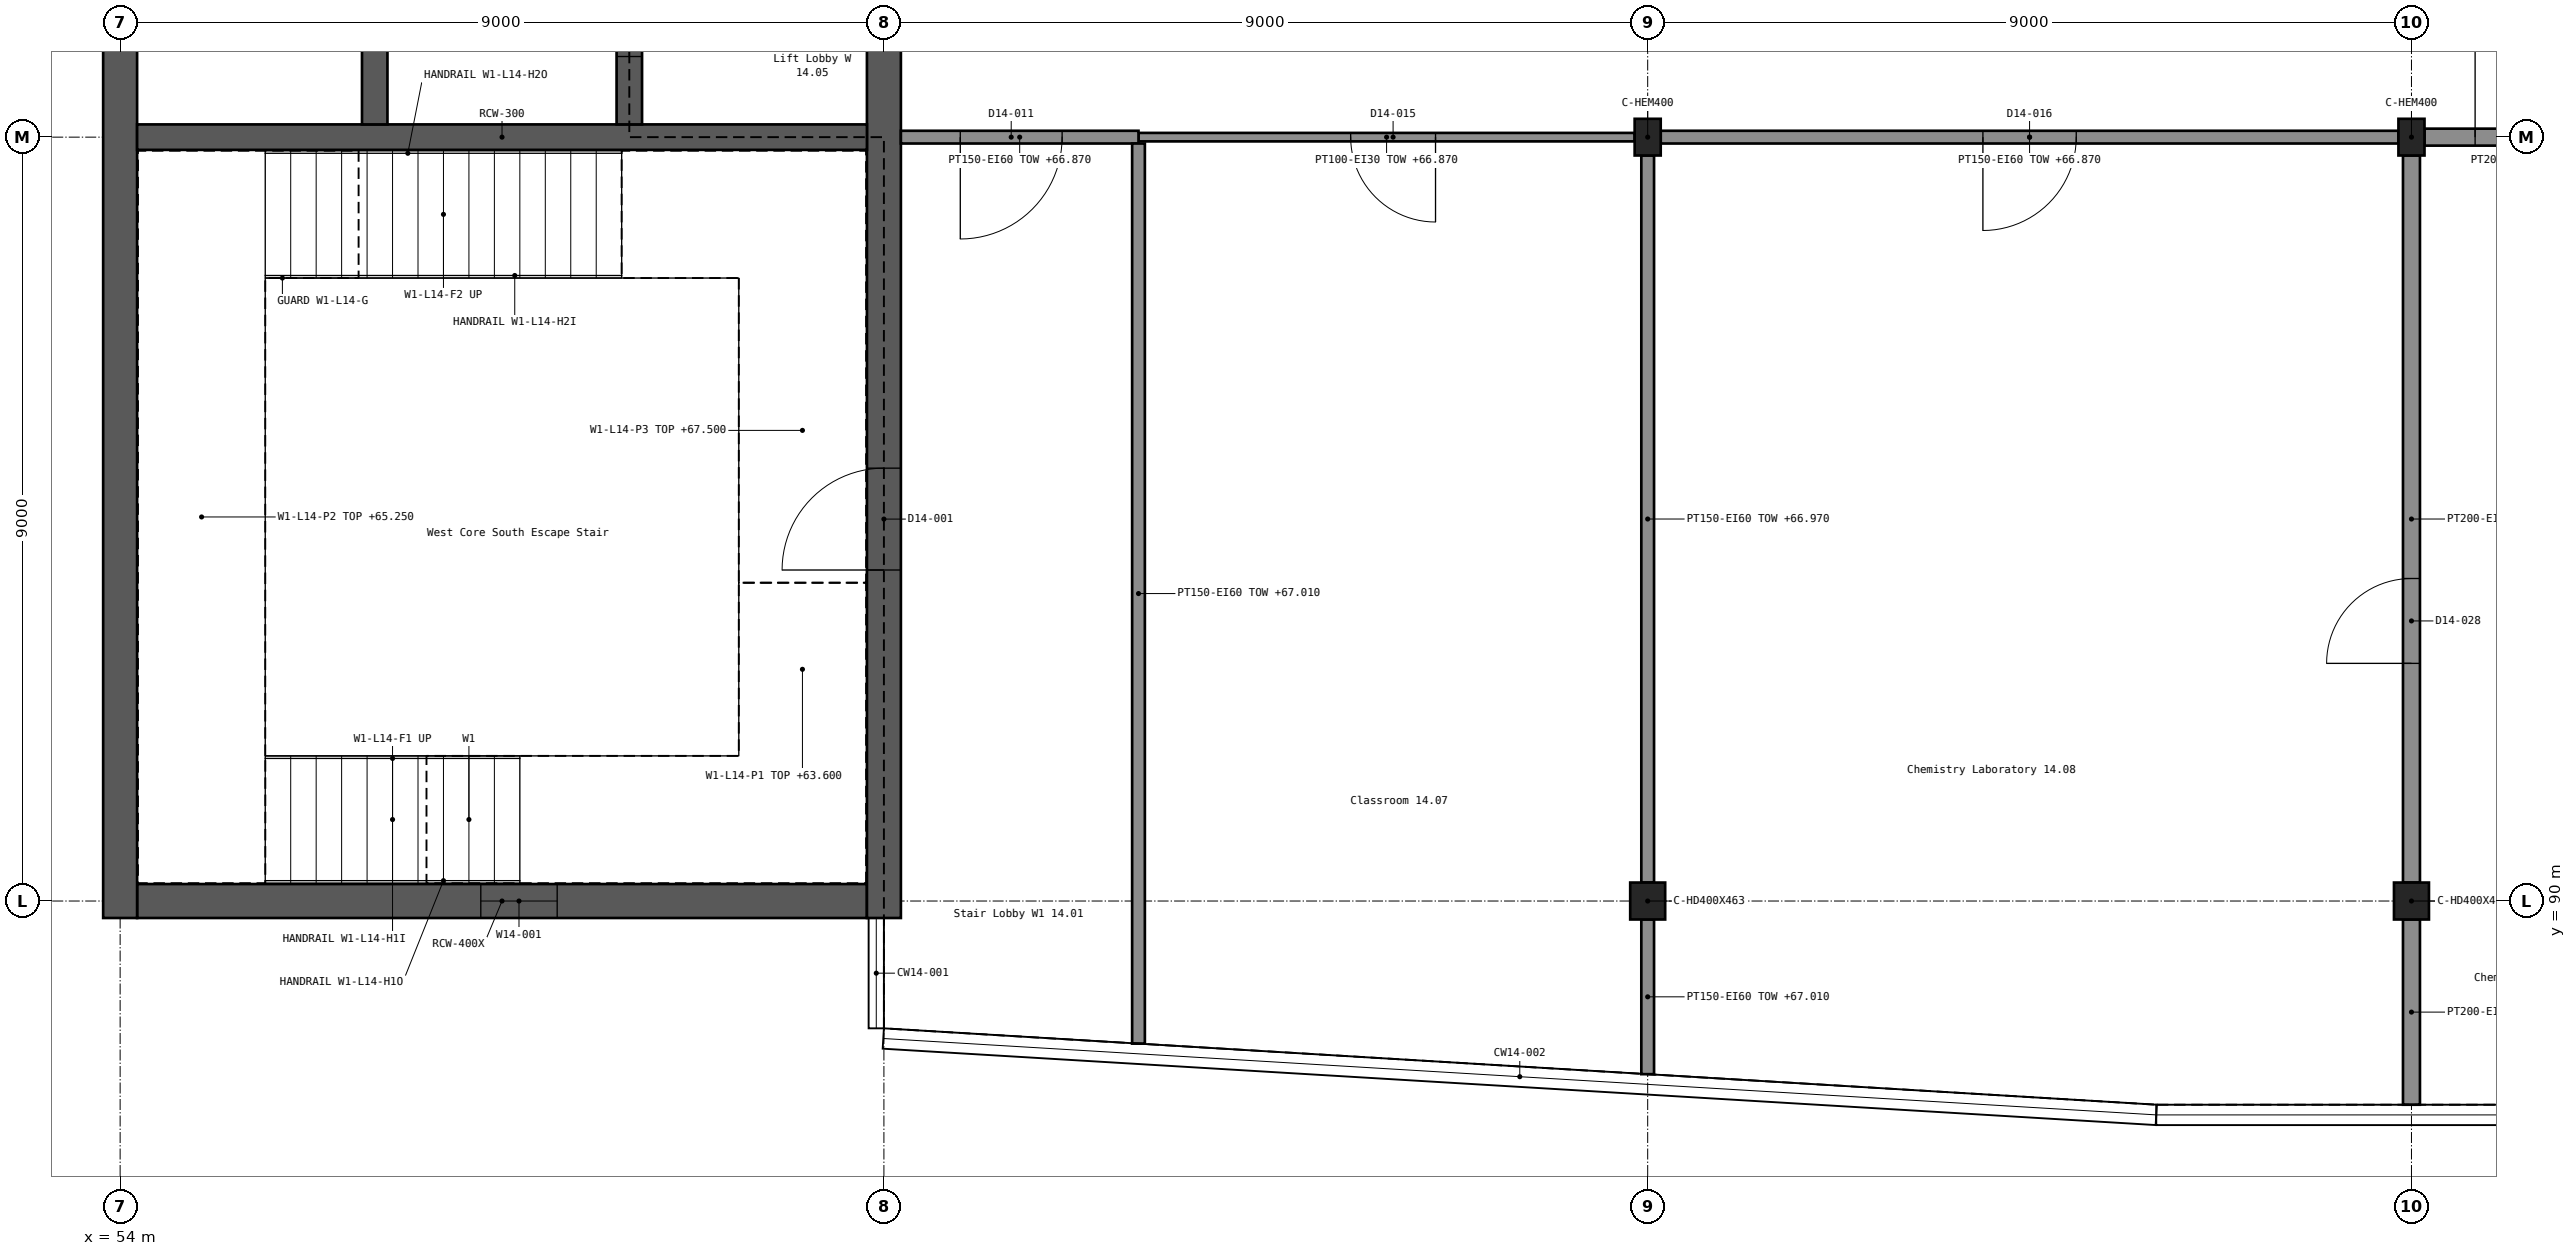
"""IFC4 building model, lengths in metres.
Left out: names, types, materials, properties, quantities, classifications, styles, units other than length and angle.
Written with IfcOpenShell. Run it as: python <this file> out.ifc"""

import sys

from ifc_helpers import new_model, si_unit, direction, frame, frame_2d, origin, origin_2d, place, context, subcontext, project, spatial, rectangle, i_section, extrude, element, fill, save


model = new_model("IFC4")
c1 = context("Model", 3, precision=1e-05, world=origin(), true_north=direction((0.0, 1.0)))
c2 = subcontext(c1, "Body", "Model", "MODEL_VIEW")
j1 = project(units=[si_unit("LENGTHUNIT", "METRE"), si_unit("PLANEANGLEUNIT", "RADIAN")], contexts=[c1])
p1 = place(None, origin())
s1 = spatial("IfcSite", under=j1, at=p1, CompositionType="ELEMENT")
p2 = place(p1, origin())
s2 = spatial("IfcBuilding", under=s1, at=p2, CompositionType="ELEMENT")
p3 = place(p2, frame((0.0, 0.0, 63.6)))
s3 = spatial("IfcBuildingStorey", under=s2, at=p3, CompositionType="ELEMENT", Elevation=63.6)
p4 = place(p3, frame((54.2, 90.0, 0.0), z_axis=(0.0, 0.0, 1.0), x_axis=(1.0, 0.0, 0.0)))
e1 = element("IfcWall", 1, at=p4, inside=s3, PredefinedType="SHEAR", context=c2, shape_type="SweptSolid", body=[
    extrude(rectangle(XDim=8.6, YDim=0.4, at=frame_2d((4.3, 0.0))), origin(), (0.0, 0.0, 1.0), 3.9),
])
p5 = place(p4, frame((4.05, 0.0, 1.2)))
e2 = element("IfcOpeningElement", 2, at=p5, cuts=e1, PredefinedType="OPENING", context=c2, shape_type="SweptSolid", body=[
    extrude(rectangle(XDim=0.9, YDim=1.5, at=frame_2d((0.45, 0.75))), frame((0.0, 0.211, 0.0), z_axis=(0.0, -1.0, 0.0), x_axis=(1.0, 0.0, 0.0)), (0.0, 0.0, 1.0), 0.422),
])
p6 = place(p3, frame((54.0, 89.8, 0.0), z_axis=(0.0, 0.0, 1.0), x_axis=(0.0, 1.0, 0.0)))
e3 = element("IfcWall", 3, at=p6, inside=s3, PredefinedType="SHEAR", context=c2, shape_type="SweptSolid", body=[
    extrude(rectangle(XDim=27.4, YDim=0.4, at=frame_2d((13.7, 0.0))), origin(), (0.0, 0.0, 1.0), 3.9),
])
p7 = place(p3, frame((63.0, 89.8, 0.0), z_axis=(0.0, 0.0, 1.0), x_axis=(0.0, 1.0, 0.0)))
e4 = element("IfcWall", 4, at=p7, inside=s3, PredefinedType="SHEAR", context=c2, shape_type="SweptSolid", body=[
    extrude(rectangle(XDim=27.4, YDim=0.4, at=frame_2d((13.7, 0.0))), origin(), (0.0, 0.0, 1.0), 3.9),
])
p8 = place(p7, frame((4.1, 0.0, 0.0)))
e5 = element("IfcOpeningElement", 5, at=p8, cuts=e4, PredefinedType="OPENING", context=c2, shape_type="SweptSolid", body=[
    extrude(rectangle(XDim=1.2, YDim=2.1, at=frame_2d((0.6, 1.05))), frame((0.0, 0.211, 0.0), z_axis=(0.0, -1.0, 0.0), x_axis=(1.0, 0.0, 0.0)), (0.0, 0.0, 1.0), 0.422),
])
p9 = place(p7, frame((22.1, 0.0, 0.0)))
e6 = element("IfcOpeningElement", 6, at=p9, cuts=e4, PredefinedType="OPENING", context=c2, shape_type="SweptSolid", body=[
    extrude(rectangle(XDim=1.2, YDim=2.1, at=frame_2d((0.6, 1.05))), frame((0.0, 0.211, 0.0), z_axis=(0.0, -1.0, 0.0), x_axis=(1.0, 0.0, 0.0)), (0.0, 0.0, 1.0), 0.422),
])
p10 = place(p7, frame((12.5, 0.0, 0.0)))
e7 = element("IfcOpeningElement", 7, at=p10, cuts=e4, PredefinedType="OPENING", context=c2, shape_type="SweptSolid", body=[
    extrude(rectangle(XDim=2.0, YDim=2.1, at=frame_2d((1.0, 1.05))), frame((0.0, 0.211, 0.0), z_axis=(0.0, -1.0, 0.0), x_axis=(1.0, 0.0, 0.0)), (0.0, 0.0, 1.0), 0.422),
])
p11 = place(p3, frame((54.2, 99.0, 0.0), z_axis=(0.0, 0.0, 1.0), x_axis=(1.0, 0.0, 0.0)))
e8 = element("IfcWall", 8, at=p11, inside=s3, PredefinedType="SHEAR", context=c2, shape_type="SweptSolid", body=[
    extrude(rectangle(XDim=8.6, YDim=0.3, at=frame_2d((4.3, 0.0))), origin(), (0.0, 0.0, 1.0), 3.9),
])
p12 = place(p3, frame((57.0, 99.15, 0.0), z_axis=(0.0, 0.0, 1.0), x_axis=(0.0, 1.0, 0.0)))
e9 = element("IfcWall", 9, at=p12, inside=s3, PredefinedType="SHEAR", context=c2, shape_type="SweptSolid", body=[
    extrude(rectangle(XDim=8.7, YDim=0.3, at=frame_2d((4.35, 0.0))), origin(), (0.0, 0.0, 1.0), 3.9),
])
p13 = place(p3, frame((60.0, 99.15, 0.0), z_axis=(0.0, 0.0, 1.0), x_axis=(0.0, 1.0, 0.0)))
e10 = element("IfcWall", 10, at=p13, inside=s3, PredefinedType="SHEAR", context=c2, shape_type="SweptSolid", body=[
    extrude(rectangle(XDim=8.7, YDim=0.3, at=frame_2d((4.35, 0.0))), origin(), (0.0, 0.0, 1.0), 3.9),
])
p14 = place(p13, frame((0.8, 0.0, 0.0)))
e11 = element("IfcOpeningElement", 11, at=p14, cuts=e10, PredefinedType="OPENING", context=c2, shape_type="SweptSolid", body=[
    extrude(rectangle(XDim=1.1, YDim=2.1, at=frame_2d((0.55, 1.05))), frame((0.0, 0.161, 0.0), z_axis=(0.0, -1.0, 0.0), x_axis=(1.0, 0.0, 0.0)), (0.0, 0.0, 1.0), 0.322),
])
p15 = place(p13, frame((3.8, 0.0, 0.0)))
e12 = element("IfcOpeningElement", 12, at=p15, cuts=e10, PredefinedType="OPENING", context=c2, shape_type="SweptSolid", body=[
    extrude(rectangle(XDim=1.1, YDim=2.1, at=frame_2d((0.55, 1.05))), frame((0.0, 0.161, 0.0), z_axis=(0.0, -1.0, 0.0), x_axis=(1.0, 0.0, 0.0)), (0.0, 0.0, 1.0), 0.322),
])
p16 = place(p13, frame((6.8, 0.0, 0.0)))
e13 = element("IfcOpeningElement", 13, at=p16, cuts=e10, PredefinedType="OPENING", context=c2, shape_type="SweptSolid", body=[
    extrude(rectangle(XDim=1.1, YDim=2.1, at=frame_2d((0.55, 1.05))), frame((0.0, 0.161, 0.0), z_axis=(0.0, -1.0, 0.0), x_axis=(1.0, 0.0, 0.0)), (0.0, 0.0, 1.0), 0.322),
])
for number, where, z_axis, x_axis in (
    (14, (72.0, 90.0, 0.0), (0.0, 0.0, 1.0), (1.0, 0.0, 0.0)),
    (15, (81.0, 90.0, 0.0), (0.0, 0.0, 1.0), (1.0, 0.0, 0.0)),
):
    element("IfcColumn", number, at=place(p3, frame(where, z_axis=z_axis, x_axis=x_axis)), inside=s3, PredefinedType="COLUMN", context=c2, shape_type="SweptSolid", body=[
        extrude(i_section(OverallWidth=0.412, OverallDepth=0.435, WebThickness=0.036, FlangeThickness=0.057, FilletRadius=0.015, at=origin_2d()), origin(), (0.0, 0.0, 1.0), 3.9),
    ])
for number, where, z_axis, x_axis in (
    (16, (72.0, 99.0, 0.0), (0.0, 0.0, 1.0), (1.0, 0.0, 0.0)),
    (17, (81.0, 99.0, 0.0), (0.0, 0.0, 1.0), (1.0, 0.0, 0.0)),
):
    element("IfcColumn", number, at=place(p3, frame(where, z_axis=z_axis, x_axis=x_axis)), inside=s3, PredefinedType="COLUMN", context=c2, shape_type="SweptSolid", body=[
        extrude(i_section(OverallWidth=0.307, OverallDepth=0.432, WebThickness=0.021, FlangeThickness=0.04, FilletRadius=0.027, at=origin_2d()), origin(), (0.0, 0.0, 1.0), 3.9),
    ])
p17 = place(p3, frame((66.0, 99.0, 0.0), z_axis=(0.0, 0.0, 1.0), x_axis=(1.0, 0.0, 0.0)))
e18 = element("IfcWall", 18, at=p17, inside=s3, PredefinedType="PARTITIONING", context=c2, shape_type="SweptSolid", body=[
    extrude(rectangle(XDim=5.846, YDim=0.1, at=frame_2d((2.923, 0.0))), origin(), (0.0, 0.0, 1.0), 3.27),
])
p18 = place(p17, frame((2.5, 0.0, 0.0)))
e19 = element("IfcOpeningElement", 19, at=p18, cuts=e18, PredefinedType="OPENING", context=c2, shape_type="SweptSolid", body=[
    extrude(rectangle(XDim=1.0, YDim=2.1, at=frame_2d((0.5, 1.05))), frame((0.0, 0.061, 0.0), z_axis=(0.0, -1.0, 0.0), x_axis=(1.0, 0.0, 0.0)), (0.0, 0.0, 1.0), 0.122),
])
p19 = place(p3, frame((63.2, 99.0, 0.0), z_axis=(0.0, 0.0, 1.0), x_axis=(1.0, 0.0, 0.0)))
e20 = element("IfcWall", 20, at=p19, inside=s3, PredefinedType="PARTITIONING", context=c2, shape_type="SweptSolid", body=[
    extrude(rectangle(XDim=2.8, YDim=0.15, at=frame_2d((1.4, 0.0))), origin(), (0.0, 0.0, 1.0), 3.27),
])
p20 = place(p19, frame((0.7, 0.0, 0.0)))
e21 = element("IfcOpeningElement", 21, at=p20, cuts=e20, PredefinedType="OPENING", context=c2, shape_type="SweptSolid", body=[
    extrude(rectangle(XDim=1.2, YDim=2.1, at=frame_2d((0.6, 1.05))), frame((0.0, 0.086, 0.0), z_axis=(0.0, -1.0, 0.0), x_axis=(1.0, 0.0, 0.0)), (0.0, 0.0, 1.0), 0.172),
])
p21 = place(p3, frame((72.154, 99.0, 0.0), z_axis=(0.0, 0.0, 1.0), x_axis=(1.0, 0.0, 0.0)))
e22 = element("IfcWall", 22, at=p21, inside=s3, PredefinedType="PARTITIONING", context=c2, shape_type="SweptSolid", body=[
    extrude(rectangle(XDim=8.693, YDim=0.15, at=frame_2d((4.346, 0.0))), origin(), (0.0, 0.0, 1.0), 3.27),
])
p22 = place(p21, frame((3.796, 0.0, 0.0)))
e23 = element("IfcOpeningElement", 23, at=p22, cuts=e22, PredefinedType="OPENING", context=c2, shape_type="SweptSolid", body=[
    extrude(rectangle(XDim=1.1, YDim=2.4, at=frame_2d((0.55, 1.2))), frame((0.0, 0.086, 0.0), z_axis=(0.0, -1.0, 0.0), x_axis=(1.0, 0.0, 0.0)), (0.0, 0.0, 1.0), 0.172),
])
p23 = place(p3, frame((81.154, 99.0, 0.0), z_axis=(0.0, 0.0, 1.0), x_axis=(1.0, 0.0, 0.0)))
e24 = element("IfcWall", 24, at=p23, inside=s3, PredefinedType="PARTITIONING", context=c2, shape_type="SweptSolid", body=[
    extrude(rectangle(XDim=2.846, YDim=0.2, at=frame_2d((1.423, 0.0))), origin(), (0.0, 0.0, 1.0), 3.27),
])
p24 = place(p23, frame((0.596, 0.0, 0.0)))
e25 = element("IfcOpeningElement", 25, at=p24, cuts=e24, PredefinedType="OPENING", context=c2, shape_type="SweptSolid", body=[
    extrude(rectangle(XDim=1.5, YDim=2.4, at=frame_2d((0.75, 1.2))), frame((0.0, 0.111, 0.0), z_axis=(0.0, -1.0, 0.0), x_axis=(1.0, 0.0, 0.0)), (0.0, 0.0, 1.0), 0.222),
])
p25 = place(p3, frame((66.0, 88.32, 0.0), z_axis=(0.0, 0.0, 1.0), x_axis=(0.0, 1.0, 0.0)))
e26 = element("IfcWall", 26, at=p25, inside=s3, PredefinedType="PARTITIONING", context=c2, shape_type="SweptSolid", body=[
    extrude(rectangle(XDim=10.605, YDim=0.15, at=frame_2d((5.302, 0.0))), origin(), (0.0, 0.0, 1.0), 3.41),
])
p26 = place(p3, frame((72.0, 87.96, 0.0), z_axis=(0.0, 0.0, 1.0), x_axis=(0.0, 1.0, 0.0)))
e27 = element("IfcWall", 27, at=p26, inside=s3, PredefinedType="PARTITIONING", context=c2, shape_type="SweptSolid", body=[
    extrude(rectangle(XDim=1.823, YDim=0.15, at=frame_2d((0.911, 0.0))), origin(), (0.0, 0.0, 1.0), 3.41),
])
p27 = place(p3, frame((72.0, 90.218, 0.0), z_axis=(0.0, 0.0, 1.0), x_axis=(0.0, 1.0, 0.0)))
e28 = element("IfcWall", 28, at=p27, inside=s3, PredefinedType="PARTITIONING", context=c2, shape_type="SweptSolid", body=[
    extrude(rectangle(XDim=8.566, YDim=0.15, at=frame_2d((4.283, 0.0))), origin(), (0.0, 0.0, 1.0), 3.37),
])
p28 = place(p3, frame((81.0, 87.6, 0.0), z_axis=(0.0, 0.0, 1.0), x_axis=(0.0, 1.0, 0.0)))
e29 = element("IfcWall", 29, at=p28, inside=s3, PredefinedType="PARTITIONING", context=c2, shape_type="SweptSolid", body=[
    extrude(rectangle(XDim=2.182, YDim=0.2, at=frame_2d((1.091, 0.0))), origin(), (0.0, 0.0, 1.0), 3.41),
])
p29 = place(p3, frame((81.0, 90.218, 0.0), z_axis=(0.0, 0.0, 1.0), x_axis=(0.0, 1.0, 0.0)))
e30 = element("IfcWall", 30, at=p29, inside=s3, PredefinedType="PARTITIONING", context=c2, shape_type="SweptSolid", body=[
    extrude(rectangle(XDim=8.566, YDim=0.2, at=frame_2d((4.283, 0.0))), origin(), (0.0, 0.0, 1.0), 3.37),
])
p30 = place(p29, frame((2.583, 0.0, 0.0)))
e31 = element("IfcOpeningElement", 31, at=p30, cuts=e30, PredefinedType="OPENING", context=c2, shape_type="SweptSolid", body=[
    extrude(rectangle(XDim=1.0, YDim=2.1, at=frame_2d((0.5, 1.05))), frame((0.0, 0.111, 0.0), z_axis=(0.0, -1.0, 0.0), x_axis=(1.0, 0.0, 0.0)), (0.0, 0.0, 1.0), 0.222),
])
p31 = place(p5, origin())
e32 = element("IfcWindow", 32, at=p31, inside=s3, PartitioningType="SINGLE_PANEL", PredefinedType="WINDOW", context=c2, shape_type="SweptSolid", body=[
    extrude(rectangle(XDim=0.9, YDim=1.5, at=frame_2d((0.45, 0.75))), frame((0.0, 0.03, 0.0), z_axis=(0.0, -1.0, 0.0), x_axis=(1.0, 0.0, 0.0)), (0.0, 0.0, 1.0), 0.06),
])
fill(e2, e32)
p32 = place(p8, origin())
e33 = element("IfcDoor", 33, at=p32, inside=s3, OperationType="SINGLE_SWING_LEFT", PredefinedType="DOOR", context=c2, shape_type="SweptSolid", body=[
    extrude(rectangle(XDim=1.2, YDim=2.1, at=frame_2d((0.6, 1.05))), frame((0.0, 0.025, 0.0), z_axis=(0.0, -1.0, 0.0), x_axis=(1.0, 0.0, 0.0)), (0.0, 0.0, 1.0), 0.05),
])
fill(e5, e33)
p33 = place(p14, origin())
e34 = element("IfcDoor", 34, at=p33, inside=s3, OperationType="DOUBLE_DOOR_SLIDING", PredefinedType="DOOR", context=c2, shape_type="SweptSolid", body=[
    extrude(rectangle(XDim=1.1, YDim=2.1, at=frame_2d((0.55, 1.05))), frame((0.0, 0.025, 0.0), z_axis=(0.0, -1.0, 0.0), x_axis=(1.0, 0.0, 0.0)), (0.0, 0.0, 1.0), 0.05),
])
fill(e11, e34)
p34 = place(p20, frame((1.2, 0.0, 0.0), z_axis=(0.0, 0.0, 1.0), x_axis=(-1.0, 0.0, 0.0)))
e35 = element("IfcDoor", 35, at=p34, inside=s3, OperationType="SINGLE_SWING_RIGHT", PredefinedType="DOOR", context=c2, shape_type="SweptSolid", body=[
    extrude(rectangle(XDim=1.2, YDim=2.1, at=frame_2d((0.6, 1.05))), frame((0.0, 0.025, 0.0), z_axis=(0.0, -1.0, 0.0), x_axis=(1.0, 0.0, 0.0)), (0.0, 0.0, 1.0), 0.05),
])
fill(e21, e35)
p35 = place(p18, frame((1.0, 0.0, 0.0), z_axis=(0.0, 0.0, 1.0), x_axis=(-1.0, 0.0, 0.0)))
e36 = element("IfcDoor", 36, at=p35, inside=s3, OperationType="SINGLE_SWING_LEFT", PredefinedType="DOOR", context=c2, shape_type="SweptSolid", body=[
    extrude(rectangle(XDim=1.0, YDim=2.1, at=frame_2d((0.5, 1.05))), frame((0.0, 0.025, 0.0), z_axis=(0.0, -1.0, 0.0), x_axis=(1.0, 0.0, 0.0)), (0.0, 0.0, 1.0), 0.05),
])
fill(e19, e36)
p36 = place(p22, frame((1.1, 0.0, 0.0), z_axis=(0.0, 0.0, 1.0), x_axis=(-1.0, 0.0, 0.0)))
e37 = element("IfcDoor", 37, at=p36, inside=s3, OperationType="SINGLE_SWING_RIGHT", PredefinedType="DOOR", context=c2, shape_type="SweptSolid", body=[
    extrude(rectangle(XDim=1.1, YDim=2.4, at=frame_2d((0.55, 1.2))), frame((0.0, 0.025, 0.0), z_axis=(0.0, -1.0, 0.0), x_axis=(1.0, 0.0, 0.0)), (0.0, 0.0, 1.0), 0.05),
])
fill(e23, e37)
p37 = place(p24, origin())
e38 = element("IfcDoor", 38, at=p37, inside=s3, OperationType="DOUBLE_DOOR_SINGLE_SWING", PredefinedType="DOOR", context=c2, shape_type="SweptSolid", body=[
    extrude(rectangle(XDim=1.5, YDim=2.4, at=frame_2d((0.75, 1.2))), frame((0.0, 0.025, 0.0), z_axis=(0.0, -1.0, 0.0), x_axis=(1.0, 0.0, 0.0)), (0.0, 0.0, 1.0), 0.05),
])
fill(e25, e38)
p38 = place(p30, origin())
e39 = element("IfcDoor", 39, at=p38, inside=s3, OperationType="SINGLE_SWING_LEFT", PredefinedType="DOOR", context=c2, shape_type="SweptSolid", body=[
    extrude(rectangle(XDim=1.0, YDim=2.1, at=frame_2d((0.5, 1.05))), frame((0.0, 0.025, 0.0), z_axis=(0.0, -1.0, 0.0), x_axis=(1.0, 0.0, 0.0)), (0.0, 0.0, 1.0), 0.05),
])
fill(e31, e39)
save(model, sys.argv[1])
